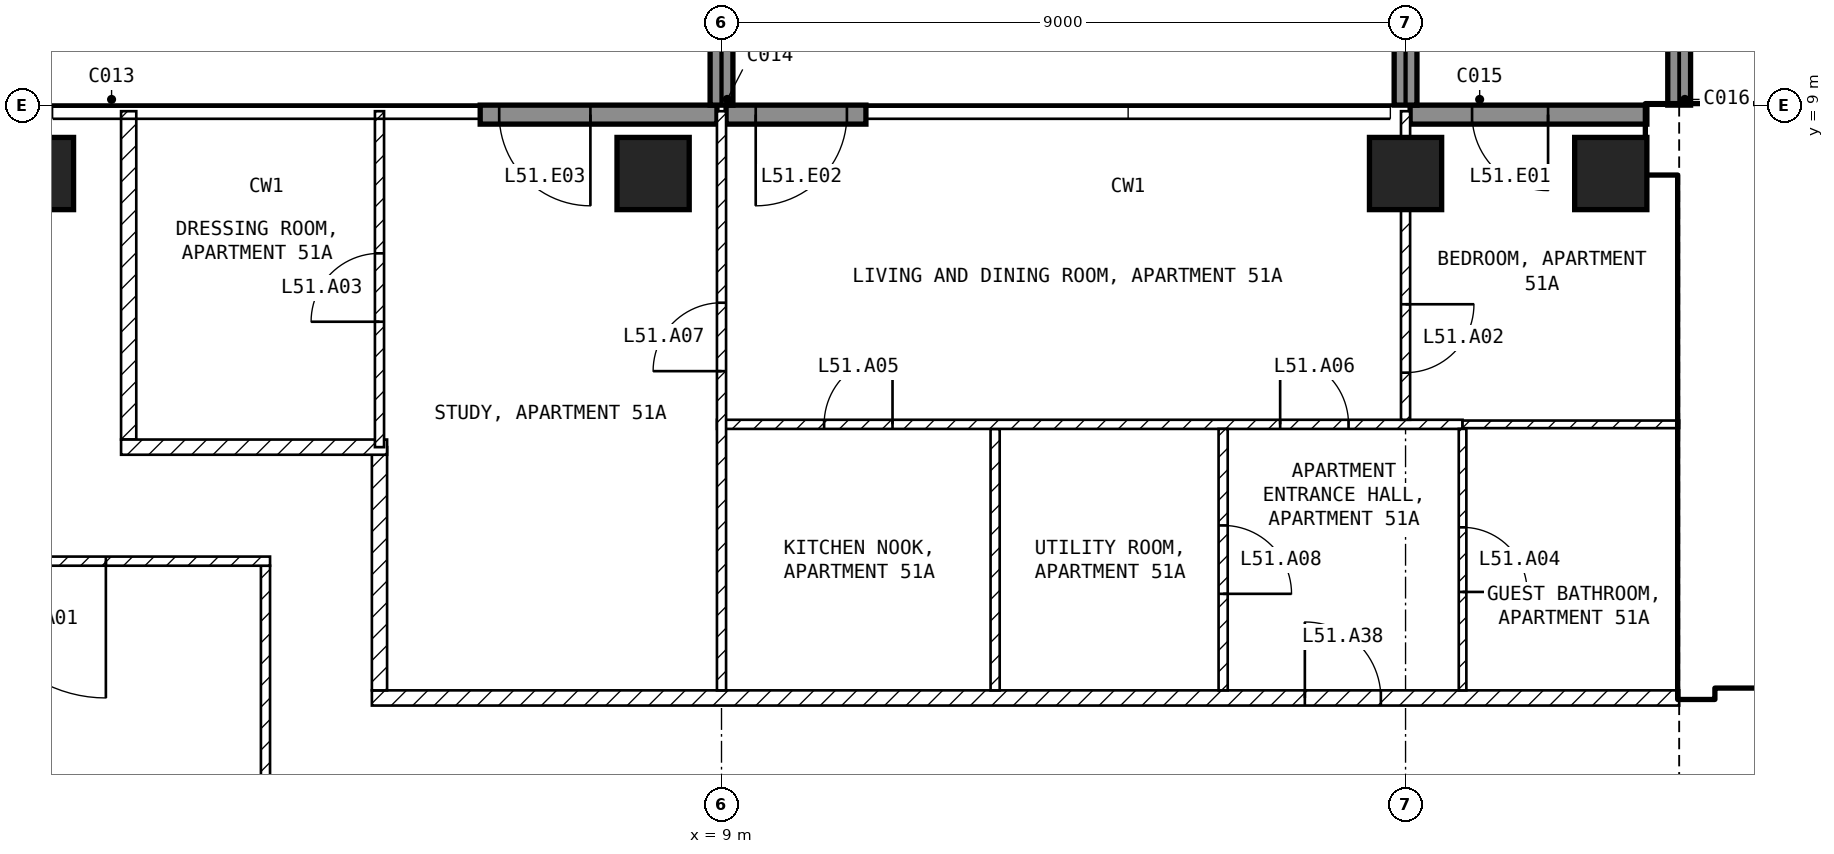
"""IFC4 building model, lengths in metres.
Left out: names, types, materials, properties, quantities, classifications, styles, units other than length and angle.
Written with IfcOpenShell. Run it as: python <this file> out.ifc"""

import sys

from ifc_helpers import new_model, si_unit, direction, frame, frame_2d, origin, origin_2d, place, context, subcontext, project, spatial, rectangle, extrude, element, fill, save


model = new_model("IFC4")
c1 = context("Model", 3, precision=1e-05, world=origin(), true_north=direction((0.0, 1.0)))
c2 = subcontext(c1, "Body", "Model", "MODEL_VIEW")
j1 = project(units=[si_unit("LENGTHUNIT", "METRE"), si_unit("PLANEANGLEUNIT", "RADIAN")], contexts=[c1])
p1 = place(None, origin())
s1 = spatial("IfcSite", under=j1, at=p1, CompositionType="ELEMENT")
p2 = place(p1, origin())
s2 = spatial("IfcBuilding", under=s1, at=p2, CompositionType="ELEMENT")
p3 = place(p2, frame((0.0, 0.0, 205.1)))
s3 = spatial("IfcBuildingStorey", under=s2, at=p3, CompositionType="ELEMENT", Elevation=205.1)
for number, where, z_axis, x_axis in (
    (1, (0.0, 8.1, -0.25), (0.0, 0.0, 1.0), (1.0, 0.0, 0.0)),
    (2, (8.1, 8.1, -0.25), (0.0, 0.0, 1.0), (1.0, 0.0, 0.0)),
    (3, (18.0, 8.1, -0.25), (0.0, 0.0, 1.0), (1.0, 0.0, 0.0)),
    (4, (20.7, 8.1, -0.25), (0.0, 0.0, 1.0), (1.0, 0.0, 0.0)),
):
    element("IfcColumn", number, at=place(p3, frame(where, z_axis=z_axis, x_axis=x_axis)), inside=s3, PredefinedType="COLUMN", context=c2, shape_type="SweptSolid", body=[
        extrude(rectangle(XDim=0.95, YDim=0.95, at=origin_2d()), origin(), (0.0, 0.0, 1.0), 3.5),
    ])
p4 = place(p3, frame((21.175, 8.875, 0.0), z_axis=(0.0, 0.0, 1.0), x_axis=(-1.0, 0.0, 0.0)))
e5 = element("IfcWall", 5, at=p4, inside=s3, PredefinedType="SOLIDWALL", context=c2, shape_type="SweptSolid", body=[
    extrude(rectangle(XDim=3.115, YDim=0.25, at=frame_2d((1.558, 0.0))), origin(), (0.0, 0.0, 1.0), 3.25),
])
p5 = place(p4, frame((1.3, 0.0, 0.0)))
e6 = element("IfcOpeningElement", 6, at=p5, cuts=e5, PredefinedType="OPENING", context=c2, shape_type="SweptSolid", body=[
    extrude(rectangle(XDim=1.0, YDim=2.4, at=frame_2d((0.5, 1.2))), frame((0.0, 0.135, 0.0), z_axis=(0.0, -1.0, 0.0), x_axis=(1.0, 0.0, 0.0)), (0.0, 0.0, 1.0), 0.27),
])
p6 = place(p3, frame((10.9, 8.875, 0.0), z_axis=(0.0, 0.0, 1.0), x_axis=(-1.0, 0.0, 0.0)))
e7 = element("IfcWall", 7, at=p6, inside=s3, PredefinedType="SOLIDWALL", context=c2, shape_type="SweptSolid", body=[
    extrude(rectangle(XDim=1.84, YDim=0.25, at=frame_2d((0.92, 0.0))), origin(), (0.0, 0.0, 1.0), 3.25),
])
p7 = place(p6, frame((0.25, 0.0, 0.0)))
e8 = element("IfcOpeningElement", 8, at=p7, cuts=e7, PredefinedType="OPENING", context=c2, shape_type="SweptSolid", body=[
    extrude(rectangle(XDim=1.2, YDim=2.4, at=frame_2d((0.6, 1.2))), frame((0.0, 0.135, 0.0), z_axis=(0.0, -1.0, 0.0), x_axis=(1.0, 0.0, 0.0)), (0.0, 0.0, 1.0), 0.27),
])
p8 = place(p3, frame((8.94, 8.875, 0.0), z_axis=(0.0, 0.0, 1.0), x_axis=(-1.0, 0.0, 0.0)))
e9 = element("IfcWall", 9, at=p8, inside=s3, PredefinedType="SOLIDWALL", context=c2, shape_type="SweptSolid", body=[
    extrude(rectangle(XDim=3.115, YDim=0.25, at=frame_2d((1.558, 0.0))), origin(), (0.0, 0.0, 1.0), 3.25),
])
p9 = place(p8, frame((1.665, 0.0, 0.0)))
e10 = element("IfcOpeningElement", 10, at=p9, cuts=e9, PredefinedType="OPENING", context=c2, shape_type="SweptSolid", body=[
    extrude(rectangle(XDim=1.2, YDim=2.4, at=frame_2d((0.6, 1.2))), frame((0.0, 0.135, 0.0), z_axis=(0.0, -1.0, 0.0), x_axis=(1.0, 0.0, 0.0)), (0.0, 0.0, 1.0), 0.27),
])
for number, where, z_axis, x_axis in (
    (11, (9.0, 9.0, 0.0), (0.0, 0.0, 1.0), (0.0, 1.0, 0.0)),
    (12, (18.0, 9.0, 0.0), (0.0, 0.0, 1.0), (0.0, 1.0, 0.0)),
    (13, (21.6, 9.0, 0.0), (0.0, 0.0, 1.0), (0.0, 1.0, 0.0)),
):
    element("IfcWall", number, at=place(p3, frame(where, z_axis=z_axis, x_axis=x_axis)), inside=s3, PredefinedType="SOLIDWALL", context=c2, shape_type="SweptSolid", body=[
        extrude(rectangle(XDim=2.7, YDim=0.3, at=frame_2d((1.35, 0.0))), origin(), (0.0, 0.0, 1.0), 3.25),
    ])
p10 = place(p3, frame((21.175, 8.55, 0.0), z_axis=(0.0, 0.0, 1.0), x_axis=(1.0, 0.0, 0.0)))
e14 = element("IfcWall", 14, at=p10, inside=s3, PredefinedType="SHEAR", context=c2, shape_type="SweptSolid", body=[
    extrude(rectangle(XDim=8.425, YDim=0.9, at=frame_2d((4.212, 0.0))), origin(), (0.0, 0.0, 1.0), 3.25),
])
p11 = place(p3, frame((21.825, 1.2, 0.0), z_axis=(0.0, 0.0, 1.0), x_axis=(0.0, 1.0, 0.0)))
e15 = element("IfcWall", 15, at=p11, inside=s3, PredefinedType="SHEAR", context=c2, shape_type="SweptSolid", body=[
    extrude(rectangle(XDim=6.9, YDim=0.45, at=frame_2d((3.45, 0.0))), origin(), (0.0, 0.0, 1.0), 3.25),
])
p12 = place(p3, frame((22.05, 1.45, 0.0), z_axis=(0.0, 0.0, 1.0), x_axis=(1.0, 0.0, 0.0)))
e16 = element("IfcWall", 16, at=p12, inside=s3, PredefinedType="SOLIDWALL", context=c2, shape_type="SweptSolid", body=[
    extrude(rectangle(XDim=11.15, YDim=0.2, at=frame_2d((5.575, 0.0))), origin(), (0.0, 0.0, 1.0), 3.25),
])
p13 = place(p12, frame((0.75, 0.0, 0.0)))
e17 = element("IfcOpeningElement", 17, at=p13, cuts=e16, PredefinedType="OPENING", context=c2, shape_type="SweptSolid", body=[
    extrude(rectangle(XDim=1.0, YDim=2.1, at=frame_2d((0.5, 1.05))), frame((0.0, 0.11, 0.0), z_axis=(0.0, -1.0, 0.0), x_axis=(1.0, 0.0, 0.0)), (0.0, 0.0, 1.0), 0.22),
])
p14 = place(p12, frame((3.25, 0.0, 0.0)))
e18 = element("IfcOpeningElement", 18, at=p14, cuts=e16, PredefinedType="OPENING", context=c2, shape_type="SweptSolid", body=[
    extrude(rectangle(XDim=1.0, YDim=2.1, at=frame_2d((0.5, 1.05))), frame((0.0, 0.11, 0.0), z_axis=(0.0, -1.0, 0.0), x_axis=(1.0, 0.0, 0.0)), (0.0, 0.0, 1.0), 0.22),
])
p15 = place(p12, frame((9.15, 0.0, 0.0)))
e19 = element("IfcOpeningElement", 19, at=p15, cuts=e16, PredefinedType="OPENING", context=c2, shape_type="SweptSolid", body=[
    extrude(rectangle(XDim=0.9, YDim=2.1, at=frame_2d((0.45, 1.05))), frame((0.0, 0.11, 0.0), z_axis=(0.0, -1.0, 0.0), x_axis=(1.0, 0.0, 0.0)), (0.0, 0.0, 1.0), 0.22),
])
p16 = place(p3, frame((22.05, 5.15, 0.0), z_axis=(0.0, 0.0, 1.0), x_axis=(1.0, 0.0, 0.0)))
e20 = element("IfcWall", 20, at=p16, inside=s3, PredefinedType="SOLIDWALL", context=c2, shape_type="SweptSolid", body=[
    extrude(rectangle(XDim=6.3, YDim=0.2, at=frame_2d((3.15, 0.0))), origin(), (0.0, 0.0, 1.0), 3.25),
])
p17 = place(p16, frame((0.2, 0.0, 0.0)))
e21 = element("IfcOpeningElement", 21, at=p17, cuts=e20, PredefinedType="OPENING", context=c2, shape_type="SweptSolid", body=[
    extrude(rectangle(XDim=1.0, YDim=2.1, at=frame_2d((0.5, 1.05))), frame((0.0, 0.11, 0.0), z_axis=(0.0, -1.0, 0.0), x_axis=(1.0, 0.0, 0.0)), (0.0, 0.0, 1.0), 0.22),
])
p18 = place(p3, frame((3.0, -2.94, 0.0), z_axis=(0.0, 0.0, 1.0), x_axis=(0.0, 1.0, 0.0)))
e22 = element("IfcWall", 22, at=p18, inside=s3, PredefinedType="PARTITIONING", context=c2, shape_type="SweptSolid", body=[
    extrude(rectangle(XDim=5.88, YDim=0.12, at=frame_2d((2.94, 0.0))), origin(), (0.0, 0.0, 1.0), 3.25),
])
p19 = place(p3, frame((3.06, 3.0, 0.0), z_axis=(0.0, 0.0, 1.0), x_axis=(-1.0, 0.0, 0.0)))
e23 = element("IfcWall", 23, at=p19, inside=s3, PredefinedType="PARTITIONING", context=c2, shape_type="SweptSolid", body=[
    extrude(rectangle(XDim=6.12, YDim=0.12, at=frame_2d((3.06, 0.0))), origin(), (0.0, 0.0, 1.0), 3.25),
])
p20 = place(p19, frame((2.16, 0.0, 0.0)))
e24 = element("IfcOpeningElement", 24, at=p20, cuts=e23, PredefinedType="OPENING", context=c2, shape_type="SweptSolid", body=[
    extrude(rectangle(XDim=1.8, YDim=2.1, at=frame_2d((0.9, 1.05))), frame((0.0, 0.07, 0.0), z_axis=(0.0, -1.0, 0.0), x_axis=(1.0, 0.0, 0.0)), (0.0, 0.0, 1.0), 0.14),
])
p21 = place(p3, frame((4.4, 1.2, 0.0), z_axis=(0.0, 0.0, 1.0), x_axis=(1.0, 0.0, 0.0)))
e25 = element("IfcWall", 25, at=p21, inside=s3, PredefinedType="PARTITIONING", context=c2, shape_type="SweptSolid", body=[
    extrude(rectangle(XDim=17.2, YDim=0.2, at=frame_2d((8.6, 0.0))), origin(), (0.0, 0.0, 1.0), 3.25),
])
p22 = place(p21, frame((12.275, 0.0, 0.0)))
e26 = element("IfcOpeningElement", 26, at=p22, cuts=e25, PredefinedType="OPENING", context=c2, shape_type="SweptSolid", body=[
    extrude(rectangle(XDim=1.0, YDim=2.1, at=frame_2d((0.5, 1.05))), frame((0.0, 0.11, 0.0), z_axis=(0.0, -1.0, 0.0), x_axis=(1.0, 0.0, 0.0)), (0.0, 0.0, 1.0), 0.22),
])
p23 = place(p3, frame((4.5, 4.5, 0.0), z_axis=(0.0, 0.0, 1.0), x_axis=(0.0, -1.0, 0.0)))
e27 = element("IfcWall", 27, at=p23, inside=s3, PredefinedType="PARTITIONING", context=c2, shape_type="SweptSolid", body=[
    extrude(rectangle(XDim=3.2, YDim=0.2, at=frame_2d((1.6, 0.0))), origin(), (0.0, 0.0, 1.0), 3.25),
])
p24 = place(p3, frame((1.2, 8.92, 0.0), z_axis=(0.0, 0.0, 1.0), x_axis=(0.0, -1.0, 0.0)))
e28 = element("IfcWall", 28, at=p24, inside=s3, PredefinedType="PARTITIONING", context=c2, shape_type="SweptSolid", body=[
    extrude(rectangle(XDim=4.32, YDim=0.2, at=frame_2d((2.16, 0.0))), origin(), (0.0, 0.0, 1.0), 3.25),
])
p25 = place(p3, frame((1.1, 4.5, 0.0), z_axis=(0.0, 0.0, 1.0), x_axis=(1.0, 0.0, 0.0)))
e29 = element("IfcWall", 29, at=p25, inside=s3, PredefinedType="PARTITIONING", context=c2, shape_type="SweptSolid", body=[
    extrude(rectangle(XDim=3.5, YDim=0.2, at=frame_2d((1.75, 0.0))), origin(), (0.0, 0.0, 1.0), 3.25),
])
p26 = place(p3, frame((12.6, 4.74, 0.0), z_axis=(0.0, 0.0, 1.0), x_axis=(0.0, -1.0, 0.0)))
e30 = element("IfcWall", 30, at=p26, inside=s3, PredefinedType="PARTITIONING", context=c2, shape_type="SweptSolid", body=[
    extrude(rectangle(XDim=3.44, YDim=0.12, at=frame_2d((1.72, 0.0))), origin(), (0.0, 0.0, 1.0), 3.25),
])
p27 = place(p3, frame((8.94, 4.8, 0.0), z_axis=(0.0, 0.0, 1.0), x_axis=(1.0, 0.0, 0.0)))
e31 = element("IfcWall", 31, at=p27, inside=s3, PredefinedType="PARTITIONING", context=c2, shape_type="SweptSolid", body=[
    extrude(rectangle(XDim=9.81, YDim=0.12, at=frame_2d((4.905, 0.0))), origin(), (0.0, 0.0, 1.0), 3.25),
])
p28 = place(p27, frame((1.41, 0.0, 0.0)))
e32 = element("IfcOpeningElement", 32, at=p28, cuts=e31, PredefinedType="OPENING", context=c2, shape_type="SweptSolid", body=[
    extrude(rectangle(XDim=0.9, YDim=2.1, at=frame_2d((0.45, 1.05))), frame((0.0, 0.07, 0.0), z_axis=(0.0, -1.0, 0.0), x_axis=(1.0, 0.0, 0.0)), (0.0, 0.0, 1.0), 0.14),
])
p29 = place(p27, frame((7.41, 0.0, 0.0)))
e33 = element("IfcOpeningElement", 33, at=p29, cuts=e31, PredefinedType="OPENING", context=c2, shape_type="SweptSolid", body=[
    extrude(rectangle(XDim=0.9, YDim=2.1, at=frame_2d((0.45, 1.05))), frame((0.0, 0.07, 0.0), z_axis=(0.0, -1.0, 0.0), x_axis=(1.0, 0.0, 0.0)), (0.0, 0.0, 1.0), 0.14),
])
p30 = place(p3, frame((9.0, 1.3, 0.0), z_axis=(0.0, 0.0, 1.0), x_axis=(0.0, 1.0, 0.0)))
e34 = element("IfcWall", 34, at=p30, inside=s3, PredefinedType="PARTITIONING", context=c2, shape_type="SweptSolid", body=[
    extrude(rectangle(XDim=7.62, YDim=0.12, at=frame_2d((3.81, 0.0))), origin(), (0.0, 0.0, 1.0), 3.25),
])
p31 = place(p30, frame((4.2, 0.0, 0.0)))
e35 = element("IfcOpeningElement", 35, at=p31, cuts=e34, PredefinedType="OPENING", context=c2, shape_type="SweptSolid", body=[
    extrude(rectangle(XDim=0.9, YDim=2.1, at=frame_2d((0.45, 1.05))), frame((0.0, 0.07, 0.0), z_axis=(0.0, -1.0, 0.0), x_axis=(1.0, 0.0, 0.0)), (0.0, 0.0, 1.0), 0.14),
])
p32 = place(p3, frame((15.6, 4.74, 0.0), z_axis=(0.0, 0.0, 1.0), x_axis=(0.0, -1.0, 0.0)))
e36 = element("IfcWall", 36, at=p32, inside=s3, PredefinedType="PARTITIONING", context=c2, shape_type="SweptSolid", body=[
    extrude(rectangle(XDim=3.44, YDim=0.12, at=frame_2d((1.72, 0.0))), origin(), (0.0, 0.0, 1.0), 3.25),
])
p33 = place(p32, frame((1.27, 0.0, 0.0)))
e37 = element("IfcOpeningElement", 37, at=p33, cuts=e36, PredefinedType="OPENING", context=c2, shape_type="SweptSolid", body=[
    extrude(rectangle(XDim=0.9, YDim=2.1, at=frame_2d((0.45, 1.05))), frame((0.0, 0.07, 0.0), z_axis=(0.0, -1.0, 0.0), x_axis=(1.0, 0.0, 0.0)), (0.0, 0.0, 1.0), 0.14),
])
p34 = place(p3, frame((18.75, 4.74, 0.0), z_axis=(0.0, 0.0, 1.0), x_axis=(0.0, -1.0, 0.0)))
e38 = element("IfcWall", 38, at=p34, inside=s3, PredefinedType="PARTITIONING", context=c2, shape_type="SweptSolid", body=[
    extrude(rectangle(XDim=3.44, YDim=0.1, at=frame_2d((1.72, 0.0))), origin(), (0.0, 0.0, 1.0), 3.25),
])
p35 = place(p34, frame((1.295, 0.0, 0.0)))
e39 = element("IfcOpeningElement", 39, at=p35, cuts=e38, PredefinedType="OPENING", context=c2, shape_type="SweptSolid", body=[
    extrude(rectangle(XDim=0.85, YDim=2.1, at=frame_2d((0.425, 1.05))), frame((0.0, 0.06, 0.0), z_axis=(0.0, -1.0, 0.0), x_axis=(1.0, 0.0, 0.0)), (0.0, 0.0, 1.0), 0.12),
])
p36 = place(p3, frame((18.75, 4.8, 0.0), z_axis=(0.0, 0.0, 1.0), x_axis=(1.0, 0.0, 0.0)))
e40 = element("IfcWall", 40, at=p36, inside=s3, PredefinedType="PARTITIONING", context=c2, shape_type="SweptSolid", body=[
    extrude(rectangle(XDim=2.85, YDim=0.1, at=frame_2d((1.425, 0.0))), origin(), (0.0, 0.0, 1.0), 3.25),
])
p37 = place(p3, frame((18.0, 8.92, 0.0), z_axis=(0.0, 0.0, 1.0), x_axis=(0.0, -1.0, 0.0)))
e41 = element("IfcWall", 41, at=p37, inside=s3, PredefinedType="PARTITIONING", context=c2, shape_type="SweptSolid", body=[
    extrude(rectangle(XDim=4.06, YDim=0.12, at=frame_2d((2.03, 0.0))), origin(), (0.0, 0.0, 1.0), 2.48),
])
p38 = place(p37, frame((2.54, 0.0, 0.0)))
e42 = element("IfcOpeningElement", 42, at=p38, cuts=e41, PredefinedType="OPENING", context=c2, shape_type="SweptSolid", body=[
    extrude(rectangle(XDim=0.9, YDim=2.1, at=frame_2d((0.45, 1.05))), frame((0.0, 0.07, 0.0), z_axis=(0.0, -1.0, 0.0), x_axis=(1.0, 0.0, 0.0)), (0.0, 0.0, 1.0), 0.14),
])
p39 = place(p3, frame((4.5, 4.5, 0.0), z_axis=(0.0, 0.0, 1.0), x_axis=(0.0, 1.0, 0.0)))
e43 = element("IfcWall", 43, at=p39, inside=s3, PredefinedType="PARTITIONING", context=c2, shape_type="SweptSolid", body=[
    extrude(rectangle(XDim=4.42, YDim=0.12, at=frame_2d((2.21, 0.0))), origin(), (0.0, 0.0, 1.0), 3.25),
])
p40 = place(p39, frame((1.65, 0.0, 0.0)))
e44 = element("IfcOpeningElement", 44, at=p40, cuts=e43, PredefinedType="OPENING", context=c2, shape_type="SweptSolid", body=[
    extrude(rectangle(XDim=0.9, YDim=2.1, at=frame_2d((0.45, 1.05))), frame((0.0, 0.07, 0.0), z_axis=(0.0, -1.0, 0.0), x_axis=(1.0, 0.0, 0.0)), (0.0, 0.0, 1.0), 0.14),
])
p41 = place(p5, origin())
e45 = element("IfcDoor", 45, at=p41, inside=s3, OperationType="SINGLE_SWING_LEFT", PredefinedType="DOOR", context=c2, shape_type="SweptSolid", body=[
    extrude(rectangle(XDim=1.0, YDim=2.4, at=frame_2d((0.5, 1.2))), frame((0.0, 0.025, 0.0), z_axis=(0.0, -1.0, 0.0), x_axis=(1.0, 0.0, 0.0)), (0.0, 0.0, 1.0), 0.05),
])
fill(e6, e45)
p42 = place(p7, origin())
e46 = element("IfcDoor", 46, at=p42, inside=s3, OperationType="SINGLE_SWING_RIGHT", PredefinedType="DOOR", context=c2, shape_type="SweptSolid", body=[
    extrude(rectangle(XDim=1.2, YDim=2.4, at=frame_2d((0.6, 1.2))), frame((0.0, 0.025, 0.0), z_axis=(0.0, -1.0, 0.0), x_axis=(1.0, 0.0, 0.0)), (0.0, 0.0, 1.0), 0.05),
])
fill(e8, e46)
p43 = place(p9, origin())
e47 = element("IfcDoor", 47, at=p43, inside=s3, OperationType="SINGLE_SWING_LEFT", PredefinedType="DOOR", context=c2, shape_type="SweptSolid", body=[
    extrude(rectangle(XDim=1.2, YDim=2.4, at=frame_2d((0.6, 1.2))), frame((0.0, 0.025, 0.0), z_axis=(0.0, -1.0, 0.0), x_axis=(1.0, 0.0, 0.0)), (0.0, 0.0, 1.0), 0.05),
])
fill(e10, e47)
p44 = place(p17, origin())
e48 = element("IfcDoor", 48, at=p44, inside=s3, OperationType="SINGLE_SWING_LEFT", PredefinedType="DOOR", context=c2, shape_type="SweptSolid", body=[
    extrude(rectangle(XDim=1.0, YDim=2.1, at=frame_2d((0.5, 1.05))), frame((0.0, 0.025, 0.0), z_axis=(0.0, -1.0, 0.0), x_axis=(1.0, 0.0, 0.0)), (0.0, 0.0, 1.0), 0.05),
])
fill(e21, e48)
p45 = place(p20, origin())
e49 = element("IfcDoor", 49, at=p45, inside=s3, OperationType="SINGLE_SWING_LEFT", PredefinedType="DOOR", context=c2, shape_type="SweptSolid", body=[
    extrude(rectangle(XDim=1.8, YDim=2.1, at=frame_2d((0.9, 1.05))), frame((0.0, 0.025, 0.0), z_axis=(0.0, -1.0, 0.0), x_axis=(1.0, 0.0, 0.0)), (0.0, 0.0, 1.0), 0.05),
])
fill(e24, e49)
p46 = place(p38, origin())
e50 = element("IfcDoor", 50, at=p46, inside=s3, OperationType="SINGLE_SWING_LEFT", PredefinedType="DOOR", context=c2, shape_type="SweptSolid", body=[
    extrude(rectangle(XDim=0.9, YDim=2.1, at=frame_2d((0.45, 1.05))), frame((0.0, 0.025, 0.0), z_axis=(0.0, -1.0, 0.0), x_axis=(1.0, 0.0, 0.0)), (0.0, 0.0, 1.0), 0.05),
])
fill(e42, e50)
p47 = place(p40, origin())
e51 = element("IfcDoor", 51, at=p47, inside=s3, OperationType="SINGLE_SWING_LEFT", PredefinedType="DOOR", context=c2, shape_type="SweptSolid", body=[
    extrude(rectangle(XDim=0.9, YDim=2.1, at=frame_2d((0.45, 1.05))), frame((0.0, 0.025, 0.0), z_axis=(0.0, -1.0, 0.0), x_axis=(1.0, 0.0, 0.0)), (0.0, 0.0, 1.0), 0.05),
])
fill(e44, e51)
p48 = place(p35, origin())
e52 = element("IfcDoor", 52, at=p48, inside=s3, OperationType="SINGLE_SWING_RIGHT", PredefinedType="DOOR", context=c2, shape_type="SweptSolid", body=[
    extrude(rectangle(XDim=0.85, YDim=2.1, at=frame_2d((0.425, 1.05))), frame((0.0, 0.025, 0.0), z_axis=(0.0, -1.0, 0.0), x_axis=(1.0, 0.0, 0.0)), (0.0, 0.0, 1.0), 0.05),
])
fill(e39, e52)
p49 = place(p28, origin())
e53 = element("IfcDoor", 53, at=p49, inside=s3, OperationType="SINGLE_SWING_RIGHT", PredefinedType="DOOR", context=c2, shape_type="SweptSolid", body=[
    extrude(rectangle(XDim=0.9, YDim=2.1, at=frame_2d((0.45, 1.05))), frame((0.0, 0.025, 0.0), z_axis=(0.0, -1.0, 0.0), x_axis=(1.0, 0.0, 0.0)), (0.0, 0.0, 1.0), 0.05),
])
fill(e32, e53)
p50 = place(p29, origin())
e54 = element("IfcDoor", 54, at=p50, inside=s3, OperationType="SINGLE_SWING_LEFT", PredefinedType="DOOR", context=c2, shape_type="SweptSolid", body=[
    extrude(rectangle(XDim=0.9, YDim=2.1, at=frame_2d((0.45, 1.05))), frame((0.0, 0.025, 0.0), z_axis=(0.0, -1.0, 0.0), x_axis=(1.0, 0.0, 0.0)), (0.0, 0.0, 1.0), 0.05),
])
fill(e33, e54)
p51 = place(p31, origin())
e55 = element("IfcDoor", 55, at=p51, inside=s3, OperationType="SINGLE_SWING_LEFT", PredefinedType="DOOR", context=c2, shape_type="SweptSolid", body=[
    extrude(rectangle(XDim=0.9, YDim=2.1, at=frame_2d((0.45, 1.05))), frame((0.0, 0.025, 0.0), z_axis=(0.0, -1.0, 0.0), x_axis=(1.0, 0.0, 0.0)), (0.0, 0.0, 1.0), 0.05),
])
fill(e35, e55)
p52 = place(p33, origin())
e56 = element("IfcDoor", 56, at=p52, inside=s3, OperationType="SINGLE_SWING_RIGHT", PredefinedType="DOOR", context=c2, shape_type="SweptSolid", body=[
    extrude(rectangle(XDim=0.9, YDim=2.1, at=frame_2d((0.45, 1.05))), frame((0.0, 0.025, 0.0), z_axis=(0.0, -1.0, 0.0), x_axis=(1.0, 0.0, 0.0)), (0.0, 0.0, 1.0), 0.05),
])
fill(e37, e56)
p53 = place(p22, origin())
e57 = element("IfcDoor", 57, at=p53, inside=s3, OperationType="SINGLE_SWING_LEFT", PredefinedType="DOOR", context=c2, shape_type="SweptSolid", body=[
    extrude(rectangle(XDim=1.0, YDim=2.1, at=frame_2d((0.5, 1.05))), frame((0.0, 0.025, 0.0), z_axis=(0.0, -1.0, 0.0), x_axis=(1.0, 0.0, 0.0)), (0.0, 0.0, 1.0), 0.05),
])
fill(e26, e57)
save(model, sys.argv[1])
